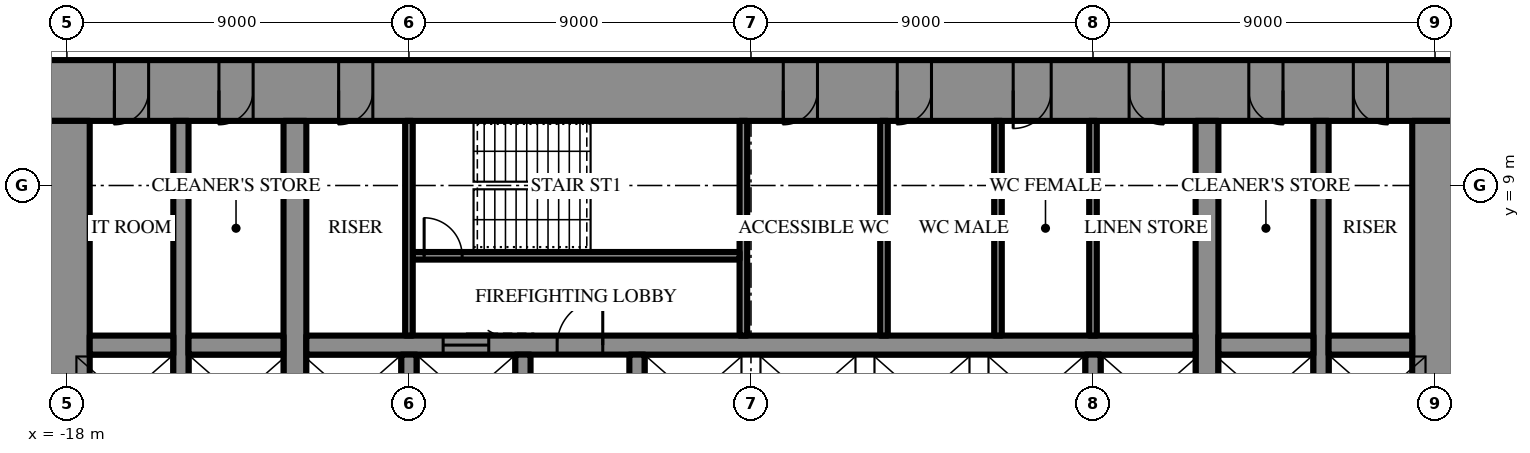
"""IFC4 building model, lengths in metres.
Left out: names, types, materials, properties, quantities, classifications, styles, units other than length and angle.
Written with IfcOpenShell. Run it as: python <this file> out.ifc"""

import sys

from ifc_helpers import new_model, si_unit, direction, frame, frame_2d, origin, place, context, subcontext, project, spatial, rectangle, extrude, element, fill, save


model = new_model("IFC4")
c1 = context("Model", 3, precision=1e-05, world=origin(), true_north=direction((0.0, 1.0)))
c2 = subcontext(c1, "Body", "Model", "MODEL_VIEW")
j1 = project(units=[si_unit("LENGTHUNIT", "METRE"), si_unit("PLANEANGLEUNIT", "RADIAN")], contexts=[c1])
p1 = place(None, origin())
s1 = spatial("IfcSite", under=j1, at=p1, CompositionType="ELEMENT")
p2 = place(p1, origin())
s2 = spatial("IfcBuilding", under=s1, at=p2, CompositionType="ELEMENT")
p3 = place(p2, frame((0.0, 0.0, 86.5)))
s3 = spatial("IfcBuildingStorey", under=s2, at=p3, CompositionType="ELEMENT", Elevation=86.5)
p4 = place(p3, frame((-18.6, 11.5, 0.0), z_axis=(0.0, 0.0, 1.0), x_axis=(1.0, 0.0, 0.0)))
e1 = element("IfcWall", 1, at=p4, inside=s3, PredefinedType="SHEAR", context=c2, shape_type="SweptSolid", body=[
    extrude(rectangle(XDim=37.2, YDim=1.6, at=frame_2d((18.6, 0.0))), origin(), (0.0, 0.0, 1.0), 4.2),
])
p5 = place(p4, frame((19.45, 0.0, 0.0)))
e2 = element("IfcOpeningElement", 2, at=p5, cuts=e1, PredefinedType="OPENING", context=c2, shape_type="SweptSolid", body=[
    extrude(rectangle(XDim=0.9, YDim=2.2, at=frame_2d((0.45, 1.1))), frame((0.0, 0.81, 0.0), z_axis=(0.0, -1.0, 0.0), x_axis=(1.0, 0.0, 0.0)), (0.0, 0.0, 1.0), 1.62),
])
p6 = place(p4, frame((22.45, 0.0, 0.0)))
e3 = element("IfcOpeningElement", 3, at=p6, cuts=e1, PredefinedType="OPENING", context=c2, shape_type="SweptSolid", body=[
    extrude(rectangle(XDim=0.9, YDim=2.2, at=frame_2d((0.45, 1.1))), frame((0.0, 0.81, 0.0), z_axis=(0.0, -1.0, 0.0), x_axis=(1.0, 0.0, 0.0)), (0.0, 0.0, 1.0), 1.62),
])
p7 = place(p4, frame((25.5, 0.0, 0.0)))
e4 = element("IfcOpeningElement", 4, at=p7, cuts=e1, PredefinedType="OPENING", context=c2, shape_type="SweptSolid", body=[
    extrude(rectangle(XDim=1.0, YDim=2.2, at=frame_2d((0.5, 1.1))), frame((0.0, 0.81, 0.0), z_axis=(0.0, -1.0, 0.0), x_axis=(1.0, 0.0, 0.0)), (0.0, 0.0, 1.0), 1.62),
])
p8 = place(p4, frame((1.85, 0.0, 0.0)))
e5 = element("IfcOpeningElement", 5, at=p8, cuts=e1, PredefinedType="OPENING", context=c2, shape_type="SweptSolid", body=[
    extrude(rectangle(XDim=0.9, YDim=2.2, at=frame_2d((0.45, 1.1))), frame((0.0, 0.81, 0.0), z_axis=(0.0, -1.0, 0.0), x_axis=(1.0, 0.0, 0.0)), (0.0, 0.0, 1.0), 1.62),
])
p9 = place(p4, frame((4.6, 0.0, 0.0)))
e6 = element("IfcOpeningElement", 6, at=p9, cuts=e1, PredefinedType="OPENING", context=c2, shape_type="SweptSolid", body=[
    extrude(rectangle(XDim=0.9, YDim=2.2, at=frame_2d((0.45, 1.1))), frame((0.0, 0.81, 0.0), z_axis=(0.0, -1.0, 0.0), x_axis=(1.0, 0.0, 0.0)), (0.0, 0.0, 1.0), 1.62),
])
p10 = place(p4, frame((7.75, 0.0, 0.0)))
e7 = element("IfcOpeningElement", 7, at=p10, cuts=e1, PredefinedType="OPENING", context=c2, shape_type="SweptSolid", body=[
    extrude(rectangle(XDim=0.9, YDim=2.2, at=frame_2d((0.45, 1.1))), frame((0.0, 0.81, 0.0), z_axis=(0.0, -1.0, 0.0), x_axis=(1.0, 0.0, 0.0)), (0.0, 0.0, 1.0), 1.62),
])
p11 = place(p4, frame((28.55, 0.0, 0.0)))
e8 = element("IfcOpeningElement", 8, at=p11, cuts=e1, PredefinedType="OPENING", context=c2, shape_type="SweptSolid", body=[
    extrude(rectangle(XDim=0.9, YDim=2.2, at=frame_2d((0.45, 1.1))), frame((0.0, 0.81, 0.0), z_axis=(0.0, -1.0, 0.0), x_axis=(1.0, 0.0, 0.0)), (0.0, 0.0, 1.0), 1.62),
])
p12 = place(p4, frame((31.7, 0.0, 0.0)))
e9 = element("IfcOpeningElement", 9, at=p12, cuts=e1, PredefinedType="OPENING", context=c2, shape_type="SweptSolid", body=[
    extrude(rectangle(XDim=0.9, YDim=2.2, at=frame_2d((0.45, 1.1))), frame((0.0, 0.81, 0.0), z_axis=(0.0, -1.0, 0.0), x_axis=(1.0, 0.0, 0.0)), (0.0, 0.0, 1.0), 1.62),
])
p13 = place(p4, frame((34.45, 0.0, 0.0)))
e10 = element("IfcOpeningElement", 10, at=p13, cuts=e1, PredefinedType="OPENING", context=c2, shape_type="SweptSolid", body=[
    extrude(rectangle(XDim=0.9, YDim=2.2, at=frame_2d((0.45, 1.1))), frame((0.0, 0.81, 0.0), z_axis=(0.0, -1.0, 0.0), x_axis=(1.0, 0.0, 0.0)), (0.0, 0.0, 1.0), 1.62),
])
p14 = place(p3, frame((18.0, -10.7, 0.0), z_axis=(0.0, 0.0, 1.0), x_axis=(0.0, 1.0, 0.0)))
e11 = element("IfcWall", 11, at=p14, inside=s3, PredefinedType="SHEAR", context=c2, shape_type="SweptSolid", body=[
    extrude(rectangle(XDim=21.4, YDim=1.2, at=frame_2d((10.7, 0.0))), origin(), (0.0, 0.0, 1.0), 4.2),
])
p15 = place(p14, frame((9.8, 0.0, 0.0)))
e12 = element("IfcOpeningElement", 12, at=p15, cuts=e11, PredefinedType="OPENING", context=c2, shape_type="SweptSolid", body=[
    extrude(rectangle(XDim=1.8, YDim=2.4, at=frame_2d((0.9, 1.2))), frame((0.0, 0.61, 0.0), z_axis=(0.0, -1.0, 0.0), x_axis=(1.0, 0.0, 0.0)), (0.0, 0.0, 1.0), 1.22),
])
p16 = place(p3, frame((-18.0, 10.7, 0.0), z_axis=(0.0, 0.0, 1.0), x_axis=(0.0, -1.0, 0.0)))
e13 = element("IfcWall", 13, at=p16, inside=s3, PredefinedType="SHEAR", context=c2, shape_type="SweptSolid", body=[
    extrude(rectangle(XDim=21.4, YDim=1.2, at=frame_2d((10.7, 0.0))), origin(), (0.0, 0.0, 1.0), 4.2),
])
p17 = place(p16, frame((9.8, 0.0, 0.0)))
e14 = element("IfcOpeningElement", 14, at=p17, cuts=e13, PredefinedType="OPENING", context=c2, shape_type="SweptSolid", body=[
    extrude(rectangle(XDim=1.8, YDim=2.4, at=frame_2d((0.9, 1.2))), frame((0.0, 0.61, 0.0), z_axis=(0.0, -1.0, 0.0), x_axis=(1.0, 0.0, 0.0)), (0.0, 0.0, 1.0), 1.22),
])
p18 = place(p3, frame((12.0, -10.7, 0.0), z_axis=(0.0, 0.0, 1.0), x_axis=(0.0, 1.0, 0.0)))
e15 = element("IfcWall", 15, at=p18, inside=s3, PredefinedType="SHEAR", context=c2, shape_type="SweptSolid", body=[
    extrude(rectangle(XDim=21.4, YDim=0.6, at=frame_2d((10.7, 0.0))), origin(), (0.0, 0.0, 1.0), 4.2),
])
p19 = place(p18, frame((9.8, 0.0, 0.0)))
e16 = element("IfcOpeningElement", 16, at=p19, cuts=e15, PredefinedType="OPENING", context=c2, shape_type="SweptSolid", body=[
    extrude(rectangle(XDim=1.8, YDim=2.4, at=frame_2d((0.9, 1.2))), frame((0.0, 0.31, 0.0), z_axis=(0.0, -1.0, 0.0), x_axis=(1.0, 0.0, 0.0)), (0.0, 0.0, 1.0), 0.62),
])
p20 = place(p3, frame((-12.0, -10.7, 0.0), z_axis=(0.0, 0.0, 1.0), x_axis=(0.0, 1.0, 0.0)))
e17 = element("IfcWall", 17, at=p20, inside=s3, PredefinedType="SHEAR", context=c2, shape_type="SweptSolid", body=[
    extrude(rectangle(XDim=21.4, YDim=0.6, at=frame_2d((10.7, 0.0))), origin(), (0.0, 0.0, 1.0), 4.2),
])
p21 = place(p20, frame((9.8, 0.0, 0.0)))
e18 = element("IfcOpeningElement", 18, at=p21, cuts=e17, PredefinedType="OPENING", context=c2, shape_type="SweptSolid", body=[
    extrude(rectangle(XDim=1.8, YDim=2.4, at=frame_2d((0.9, 1.2))), frame((0.0, 0.31, 0.0), z_axis=(0.0, -1.0, 0.0), x_axis=(1.0, 0.0, 0.0)), (0.0, 0.0, 1.0), 0.62),
])
p22 = place(p3, frame((15.0, -10.7, 0.0), z_axis=(0.0, 0.0, 1.0), x_axis=(0.0, 1.0, 0.0)))
e19 = element("IfcWall", 19, at=p22, inside=s3, PredefinedType="SHEAR", context=c2, shape_type="SweptSolid", body=[
    extrude(rectangle(XDim=21.4, YDim=0.4, at=frame_2d((10.7, 0.0))), origin(), (0.0, 0.0, 1.0), 4.2),
])
p23 = place(p22, frame((9.8, 0.0, 0.0)))
e20 = element("IfcOpeningElement", 20, at=p23, cuts=e19, PredefinedType="OPENING", context=c2, shape_type="SweptSolid", body=[
    extrude(rectangle(XDim=1.8, YDim=2.4, at=frame_2d((0.9, 1.2))), frame((0.0, 0.21, 0.0), z_axis=(0.0, -1.0, 0.0), x_axis=(1.0, 0.0, 0.0)), (0.0, 0.0, 1.0), 0.42),
])
p24 = place(p3, frame((-15.0, -10.7, 0.0), z_axis=(0.0, 0.0, 1.0), x_axis=(0.0, 1.0, 0.0)))
e21 = element("IfcWall", 21, at=p24, inside=s3, PredefinedType="SHEAR", context=c2, shape_type="SweptSolid", body=[
    extrude(rectangle(XDim=21.4, YDim=0.4, at=frame_2d((10.7, 0.0))), origin(), (0.0, 0.0, 1.0), 4.2),
])
p25 = place(p24, frame((9.8, 0.0, 0.0)))
e22 = element("IfcOpeningElement", 22, at=p25, cuts=e21, PredefinedType="OPENING", context=c2, shape_type="SweptSolid", body=[
    extrude(rectangle(XDim=1.8, YDim=2.4, at=frame_2d((0.9, 1.2))), frame((0.0, 0.21, 0.0), z_axis=(0.0, -1.0, 0.0), x_axis=(1.0, 0.0, 0.0)), (0.0, 0.0, 1.0), 0.42),
])
p26 = place(p3, frame((-17.4, 4.8, 0.0), z_axis=(0.0, 0.0, 1.0), x_axis=(1.0, 0.0, 0.0)))
e23 = element("IfcWall", 23, at=p26, inside=s3, PredefinedType="SHEAR", context=c2, shape_type="SweptSolid", body=[
    extrude(rectangle(XDim=2.2, YDim=0.5, at=frame_2d((1.1, 0.0))), origin(), (0.0, 0.0, 1.0), 4.2),
])
p27 = place(p3, frame((-14.8, 4.8, 0.0), z_axis=(0.0, 0.0, 1.0), x_axis=(1.0, 0.0, 0.0)))
e24 = element("IfcWall", 24, at=p27, inside=s3, PredefinedType="SHEAR", context=c2, shape_type="SweptSolid", body=[
    extrude(rectangle(XDim=2.5, YDim=0.5, at=frame_2d((1.25, 0.0))), origin(), (0.0, 0.0, 1.0), 4.2),
])
p28 = place(p3, frame((-11.7, 4.8, 0.0), z_axis=(0.0, 0.0, 1.0), x_axis=(1.0, 0.0, 0.0)))
e25 = element("IfcWall", 25, at=p28, inside=s3, PredefinedType="SHEAR", context=c2, shape_type="SweptSolid", body=[
    extrude(rectangle(XDim=23.4, YDim=0.5, at=frame_2d((11.7, 0.0))), origin(), (0.0, 0.0, 1.0), 4.2),
])
p29 = place(p28, frame((6.6, 0.0, 0.0)))
e26 = element("IfcOpeningElement", 26, at=p29, cuts=e25, PredefinedType="OPENING", context=c2, shape_type="SweptSolid", body=[
    extrude(rectangle(XDim=1.2, YDim=2.2, at=frame_2d((0.6, 1.1))), frame((0.0, 0.26, 0.0), z_axis=(0.0, -1.0, 0.0), x_axis=(1.0, 0.0, 0.0)), (0.0, 0.0, 1.0), 0.52),
])
p30 = place(p28, frame((3.6, 0.0, 0.0)))
e27 = element("IfcOpeningElement", 27, at=p30, cuts=e25, PredefinedType="OPENING", context=c2, shape_type="SweptSolid", body=[
    extrude(rectangle(XDim=1.2, YDim=2.2, at=frame_2d((0.6, 1.1))), frame((0.0, 0.26, 0.0), z_axis=(0.0, -1.0, 0.0), x_axis=(1.0, 0.0, 0.0)), (0.0, 0.0, 1.0), 0.52),
])
p31 = place(p3, frame((12.3, 4.8, 0.0), z_axis=(0.0, 0.0, 1.0), x_axis=(1.0, 0.0, 0.0)))
e28 = element("IfcWall", 28, at=p31, inside=s3, PredefinedType="SHEAR", context=c2, shape_type="SweptSolid", body=[
    extrude(rectangle(XDim=2.5, YDim=0.5, at=frame_2d((1.25, 0.0))), origin(), (0.0, 0.0, 1.0), 4.2),
])
p32 = place(p3, frame((15.2, 4.8, 0.0), z_axis=(0.0, 0.0, 1.0), x_axis=(1.0, 0.0, 0.0)))
e29 = element("IfcWall", 29, at=p32, inside=s3, PredefinedType="SHEAR", context=c2, shape_type="SweptSolid", body=[
    extrude(rectangle(XDim=2.2, YDim=0.5, at=frame_2d((1.1, 0.0))), origin(), (0.0, 0.0, 1.0), 4.2),
])
for number, where, z_axis, x_axis in (
    (30, (-9.0, 2.25, 0.0), (0.0, 0.0, 1.0), (0.0, 1.0, 0.0)),
    (31, (-6.0, 2.25, 0.0), (0.0, 0.0, 1.0), (0.0, 1.0, 0.0)),
    (32, (-3.0, 2.25, 0.0), (0.0, 0.0, 1.0), (0.0, 1.0, 0.0)),
    (33, (9.0, 2.25, 0.0), (0.0, 0.0, 1.0), (0.0, 1.0, 0.0)),
):
    element("IfcWall", number, at=place(p3, frame(where, z_axis=z_axis, x_axis=x_axis)), inside=s3, PredefinedType="SHEAR", context=c2, shape_type="SweptSolid", body=[
        extrude(rectangle(XDim=2.3, YDim=0.4, at=frame_2d((1.15, 0.0))), origin(), (0.0, 0.0, 1.0), 4.2),
    ])
p33 = place(p3, frame((-0.2, 5.05, 0.0), z_axis=(0.0, 0.0, 1.0), x_axis=(0.0, 1.0, 0.0)))
e34 = element("IfcWall", 34, at=p33, inside=s3, PredefinedType="SHEAR", context=c2, shape_type="SweptSolid", body=[
    extrude(rectangle(XDim=5.65, YDim=0.2, at=frame_2d((2.825, 0.0))), origin(), (0.0, 0.0, 1.0), 4.2),
])
p34 = place(p3, frame((-8.9, 7.15, 0.0), z_axis=(0.0, 0.0, 1.0), x_axis=(1.0, 0.0, 0.0)))
e35 = element("IfcWall", 35, at=p34, inside=s3, PredefinedType="SHEAR", context=c2, shape_type="SweptSolid", body=[
    extrude(rectangle(XDim=8.6, YDim=0.2, at=frame_2d((4.3, 0.0))), origin(), (0.0, 0.0, 1.0), 4.2),
])
p35 = place(p34, frame((0.3, 0.0, 0.0)))
e36 = element("IfcOpeningElement", 36, at=p35, cuts=e35, PredefinedType="OPENING", context=c2, shape_type="SweptSolid", body=[
    extrude(rectangle(XDim=1.0, YDim=2.2, at=frame_2d((0.5, 1.1))), frame((0.0, 0.11, 0.0), z_axis=(0.0, -1.0, 0.0), x_axis=(1.0, 0.0, 0.0)), (0.0, 0.0, 1.0), 0.22),
])
for number, where, z_axis, x_axis in (
    (37, (-9.0, 5.05, 0.0), (0.0, 0.0, 1.0), (0.0, 1.0, 0.0)),
    (38, (9.0, 5.05, 0.0), (0.0, 0.0, 1.0), (0.0, 1.0, 0.0)),
    (39, (3.5, 5.05, 0.0), (0.0, 0.0, 1.0), (0.0, 1.0, 0.0)),
    (40, (6.5, 5.05, 0.0), (0.0, 0.0, 1.0), (0.0, 1.0, 0.0)),
):
    element("IfcWall", number, at=place(p3, frame(where, z_axis=z_axis, x_axis=x_axis)), inside=s3, PredefinedType="PARTITIONING", context=c2, shape_type="SweptSolid", body=[
        extrude(rectangle(XDim=5.65, YDim=0.2, at=frame_2d((2.825, 0.0))), origin(), (0.0, 0.0, 1.0), 4.0),
    ])
p36 = place(p29, origin())
e41 = element("IfcDoor", 41, at=p36, inside=s3, OperationType="SINGLE_SWING_LEFT", PredefinedType="DOOR", context=c2, shape_type="SweptSolid", body=[
    extrude(rectangle(XDim=1.2, YDim=2.2, at=frame_2d((0.6, 1.1))), frame((0.0, 0.025, 0.0), z_axis=(0.0, -1.0, 0.0), x_axis=(1.0, 0.0, 0.0)), (0.0, 0.0, 1.0), 0.05),
])
fill(e26, e41)
p37 = place(p35, origin())
e42 = element("IfcDoor", 42, at=p37, inside=s3, OperationType="SINGLE_SWING_RIGHT", PredefinedType="DOOR", context=c2, shape_type="SweptSolid", body=[
    extrude(rectangle(XDim=1.0, YDim=2.2, at=frame_2d((0.5, 1.1))), frame((0.0, 0.025, 0.0), z_axis=(0.0, -1.0, 0.0), x_axis=(1.0, 0.0, 0.0)), (0.0, 0.0, 1.0), 0.05),
])
fill(e36, e42)
p38 = place(p5, frame((0.9, 0.0, 0.0), z_axis=(0.0, 0.0, 1.0), x_axis=(-1.0, 0.0, 0.0)))
e43 = element("IfcDoor", 43, at=p38, inside=s3, OperationType="SINGLE_SWING_LEFT", PredefinedType="DOOR", context=c2, shape_type="SweptSolid", body=[
    extrude(rectangle(XDim=0.9, YDim=2.2, at=frame_2d((0.45, 1.1))), frame((0.0, 0.025, 0.0), z_axis=(0.0, -1.0, 0.0), x_axis=(1.0, 0.0, 0.0)), (0.0, 0.0, 1.0), 0.05),
])
fill(e2, e43)
p39 = place(p6, frame((0.9, 0.0, 0.0), z_axis=(0.0, 0.0, 1.0), x_axis=(-1.0, 0.0, 0.0)))
e44 = element("IfcDoor", 44, at=p39, inside=s3, OperationType="SINGLE_SWING_LEFT", PredefinedType="DOOR", context=c2, shape_type="SweptSolid", body=[
    extrude(rectangle(XDim=0.9, YDim=2.2, at=frame_2d((0.45, 1.1))), frame((0.0, 0.025, 0.0), z_axis=(0.0, -1.0, 0.0), x_axis=(1.0, 0.0, 0.0)), (0.0, 0.0, 1.0), 0.05),
])
fill(e3, e44)
p40 = place(p7, frame((1.0, 0.0, 0.0), z_axis=(0.0, 0.0, 1.0), x_axis=(-1.0, 0.0, 0.0)))
e45 = element("IfcDoor", 45, at=p40, inside=s3, OperationType="SINGLE_SWING_LEFT", PredefinedType="DOOR", context=c2, shape_type="SweptSolid", body=[
    extrude(rectangle(XDim=1.0, YDim=2.2, at=frame_2d((0.5, 1.1))), frame((0.0, 0.025, 0.0), z_axis=(0.0, -1.0, 0.0), x_axis=(1.0, 0.0, 0.0)), (0.0, 0.0, 1.0), 0.05),
])
fill(e4, e45)
p41 = place(p8, frame((0.9, 0.0, 0.0), z_axis=(0.0, 0.0, 1.0), x_axis=(-1.0, 0.0, 0.0)))
e46 = element("IfcDoor", 46, at=p41, inside=s3, OperationType="SINGLE_SWING_LEFT", PredefinedType="DOOR", context=c2, shape_type="SweptSolid", body=[
    extrude(rectangle(XDim=0.9, YDim=2.2, at=frame_2d((0.45, 1.1))), frame((0.0, 0.025, 0.0), z_axis=(0.0, -1.0, 0.0), x_axis=(1.0, 0.0, 0.0)), (0.0, 0.0, 1.0), 0.05),
])
fill(e5, e46)
p42 = place(p9, frame((0.9, 0.0, 0.0), z_axis=(0.0, 0.0, 1.0), x_axis=(-1.0, 0.0, 0.0)))
e47 = element("IfcDoor", 47, at=p42, inside=s3, OperationType="SINGLE_SWING_LEFT", PredefinedType="DOOR", context=c2, shape_type="SweptSolid", body=[
    extrude(rectangle(XDim=0.9, YDim=2.2, at=frame_2d((0.45, 1.1))), frame((0.0, 0.025, 0.0), z_axis=(0.0, -1.0, 0.0), x_axis=(1.0, 0.0, 0.0)), (0.0, 0.0, 1.0), 0.05),
])
fill(e6, e47)
p43 = place(p10, frame((0.9, 0.0, 0.0), z_axis=(0.0, 0.0, 1.0), x_axis=(-1.0, 0.0, 0.0)))
e48 = element("IfcDoor", 48, at=p43, inside=s3, OperationType="SINGLE_SWING_LEFT", PredefinedType="DOOR", context=c2, shape_type="SweptSolid", body=[
    extrude(rectangle(XDim=0.9, YDim=2.2, at=frame_2d((0.45, 1.1))), frame((0.0, 0.025, 0.0), z_axis=(0.0, -1.0, 0.0), x_axis=(1.0, 0.0, 0.0)), (0.0, 0.0, 1.0), 0.05),
])
fill(e7, e48)
p44 = place(p11, frame((0.9, 0.0, 0.0), z_axis=(0.0, 0.0, 1.0), x_axis=(-1.0, 0.0, 0.0)))
e49 = element("IfcDoor", 49, at=p44, inside=s3, OperationType="SINGLE_SWING_RIGHT", PredefinedType="DOOR", context=c2, shape_type="SweptSolid", body=[
    extrude(rectangle(XDim=0.9, YDim=2.2, at=frame_2d((0.45, 1.1))), frame((0.0, 0.025, 0.0), z_axis=(0.0, -1.0, 0.0), x_axis=(1.0, 0.0, 0.0)), (0.0, 0.0, 1.0), 0.05),
])
fill(e8, e49)
p45 = place(p12, frame((0.9, 0.0, 0.0), z_axis=(0.0, 0.0, 1.0), x_axis=(-1.0, 0.0, 0.0)))
e50 = element("IfcDoor", 50, at=p45, inside=s3, OperationType="SINGLE_SWING_RIGHT", PredefinedType="DOOR", context=c2, shape_type="SweptSolid", body=[
    extrude(rectangle(XDim=0.9, YDim=2.2, at=frame_2d((0.45, 1.1))), frame((0.0, 0.025, 0.0), z_axis=(0.0, -1.0, 0.0), x_axis=(1.0, 0.0, 0.0)), (0.0, 0.0, 1.0), 0.05),
])
fill(e9, e50)
p46 = place(p13, frame((0.9, 0.0, 0.0), z_axis=(0.0, 0.0, 1.0), x_axis=(-1.0, 0.0, 0.0)))
e51 = element("IfcDoor", 51, at=p46, inside=s3, OperationType="SINGLE_SWING_RIGHT", PredefinedType="DOOR", context=c2, shape_type="SweptSolid", body=[
    extrude(rectangle(XDim=0.9, YDim=2.2, at=frame_2d((0.45, 1.1))), frame((0.0, 0.025, 0.0), z_axis=(0.0, -1.0, 0.0), x_axis=(1.0, 0.0, 0.0)), (0.0, 0.0, 1.0), 0.05),
])
fill(e10, e51)
p47 = place(p30, origin())
e52 = element("IfcDoor", 52, at=p47, inside=s3, OperationType="SLIDING_TO_LEFT", PredefinedType="DOOR", context=c2, shape_type="SweptSolid", body=[
    extrude(rectangle(XDim=1.2, YDim=2.2, at=frame_2d((0.6, 1.1))), frame((0.0, 0.025, 0.0), z_axis=(0.0, -1.0, 0.0), x_axis=(1.0, 0.0, 0.0)), (0.0, 0.0, 1.0), 0.05),
])
fill(e27, e52)
save(model, sys.argv[1])
